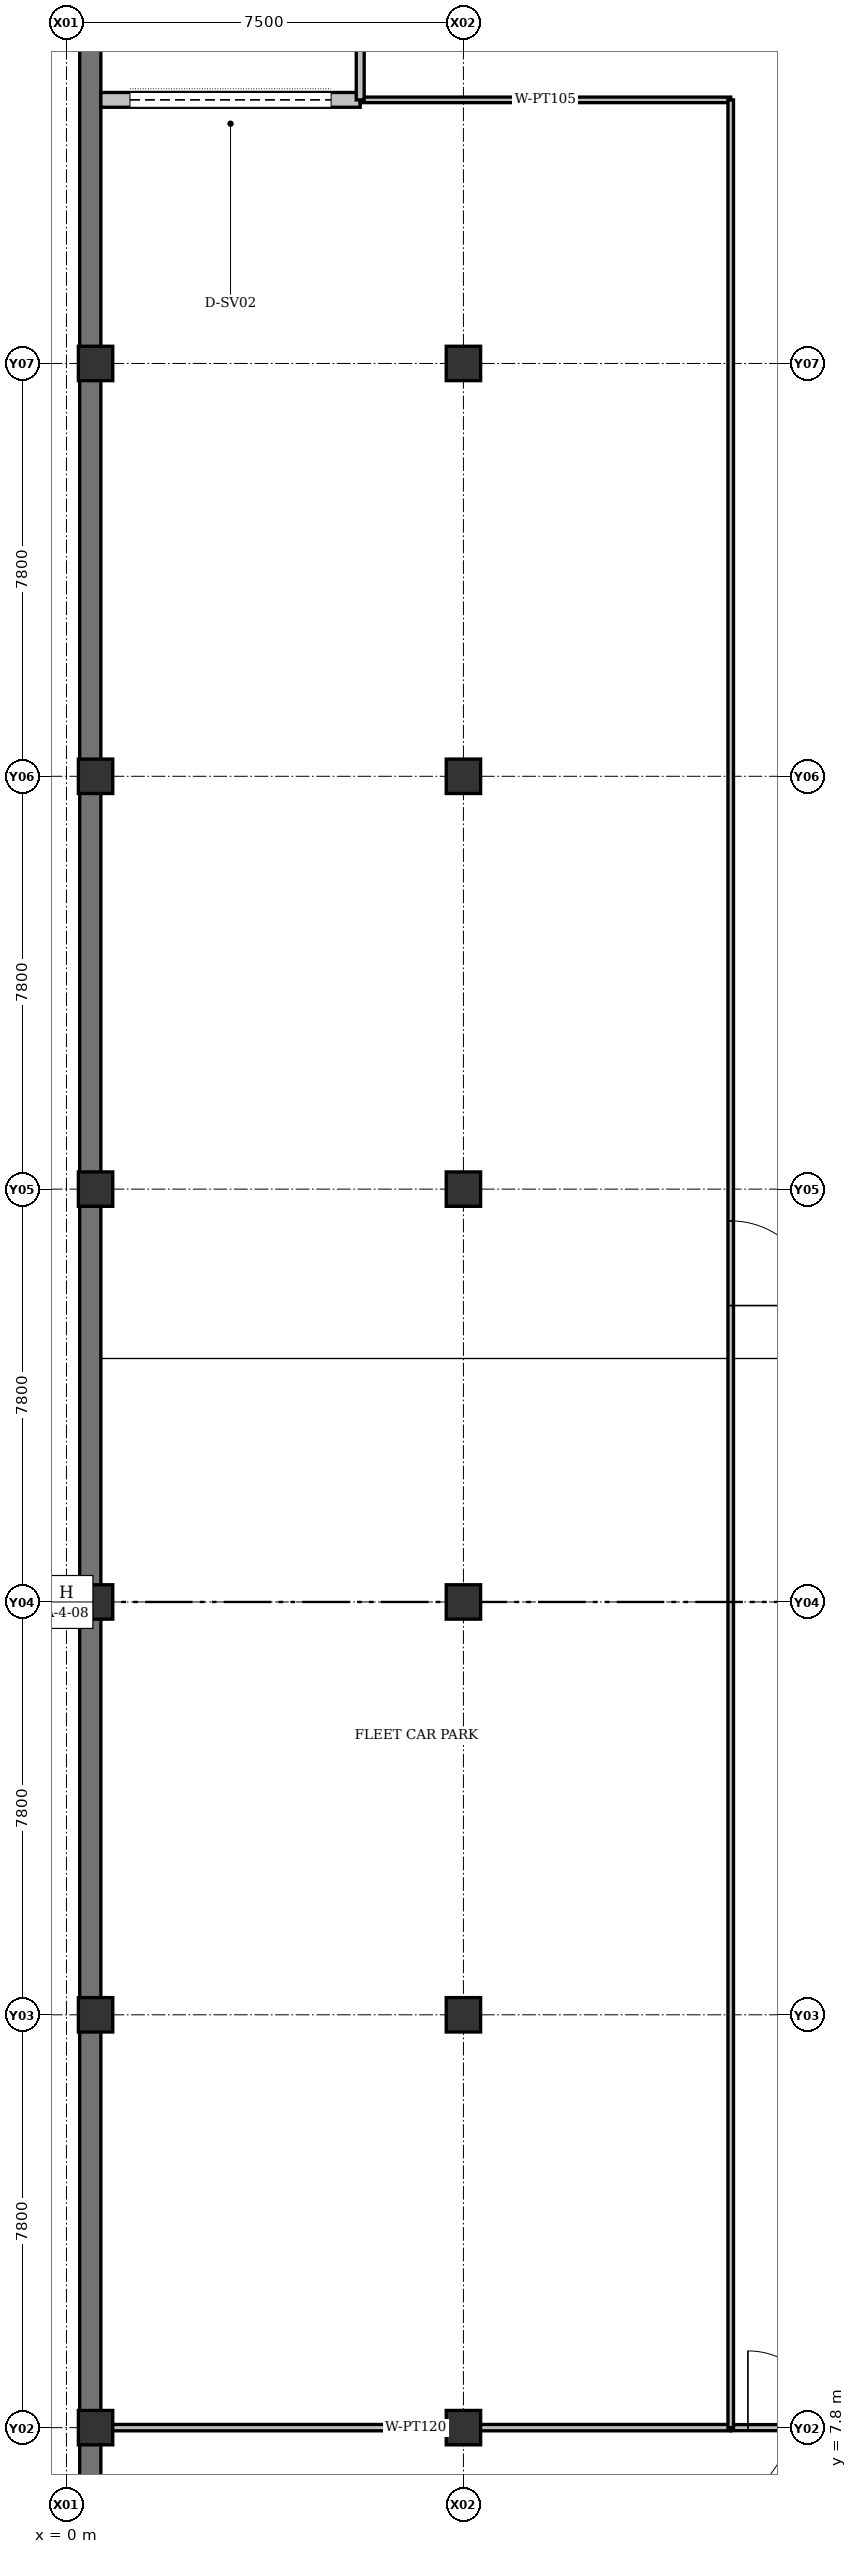
"""IFC4 building model, lengths in metres.
Left out: names, types, materials, properties, quantities, classifications, styles, units other than length and angle.
Written with IfcOpenShell. Run it as: python <this file> out.ifc"""

import sys

from ifc_helpers import new_model, si_unit, direction, frame, frame_2d, origin, origin_2d, place, context, subcontext, project, spatial, rectangle, extrude, element, fill, save


model = new_model("IFC4")
c1 = context("Model", 3, precision=1e-05, world=origin(), true_north=direction((0.0, 1.0)))
c2 = subcontext(c1, "Body", "Model", "MODEL_VIEW")
j1 = project(units=[si_unit("LENGTHUNIT", "METRE"), si_unit("PLANEANGLEUNIT", "RADIAN")], contexts=[c1])
p1 = place(None, origin())
s1 = spatial("IfcSite", under=j1, at=p1, CompositionType="ELEMENT")
p2 = place(p1, origin())
s2 = spatial("IfcBuilding", under=s1, at=p2, CompositionType="ELEMENT")
p3 = place(p2, frame((0.0, 0.0, -8.4)))
s3 = spatial("IfcBuildingStorey", under=s2, at=p3, CompositionType="ELEMENT", Elevation=-8.4)
for number, where, z_axis, x_axis in (
    (1, (0.55, 7.8, -0.3), (0.0, 0.0, 1.0), (1.0, 0.0, 0.0)),
    (2, (0.55, 15.6, -0.3), (0.0, 0.0, 1.0), (1.0, 0.0, 0.0)),
    (3, (0.55, 23.4, -0.3), (0.0, 0.0, 1.0), (1.0, 0.0, 0.0)),
    (4, (0.55, 31.2, -0.3), (0.0, 0.0, 1.0), (1.0, 0.0, 0.0)),
    (5, (0.55, 39.0, -0.3), (0.0, 0.0, 1.0), (1.0, 0.0, 0.0)),
    (6, (0.55, 46.8, -0.3), (0.0, 0.0, 1.0), (1.0, 0.0, 0.0)),
    (7, (7.5, 7.8, -0.3), (0.0, 0.0, 1.0), (1.0, 0.0, 0.0)),
    (8, (7.5, 15.6, -0.3), (0.0, 0.0, 1.0), (1.0, 0.0, 0.0)),
    (9, (7.5, 23.4, -0.3), (0.0, 0.0, 1.0), (1.0, 0.0, 0.0)),
    (10, (7.5, 31.2, -0.3), (0.0, 0.0, 1.0), (1.0, 0.0, 0.0)),
    (11, (7.5, 39.0, -0.3), (0.0, 0.0, 1.0), (1.0, 0.0, 0.0)),
    (12, (7.5, 46.8, -0.3), (0.0, 0.0, 1.0), (1.0, 0.0, 0.0)),
):
    element("IfcColumn", number, at=place(p3, frame(where, z_axis=z_axis, x_axis=x_axis)), inside=s3, PredefinedType="COLUMN", context=c2, shape_type="SweptSolid", body=[
        extrude(rectangle(XDim=0.65, YDim=0.65, at=origin_2d()), origin(), (0.0, 0.0, 1.0), 4.5),
    ])
p4 = place(p3, frame((0.45, 0.2, -0.3), z_axis=(0.0, 0.0, 1.0), x_axis=(0.0, 1.0, 0.0)))
e13 = element("IfcWall", 13, at=p4, inside=s3, PredefinedType="USERDEFINED", context=c2, shape_type="SweptSolid", body=[
    extrude(rectangle(XDim=113.6, YDim=0.4, at=frame_2d((56.8, 0.0))), origin(), (0.0, 0.0, 1.0), 4.26),
])
p5 = place(p3, frame((0.65, 51.78, 0.0), z_axis=(0.0, 0.0, 1.0), x_axis=(1.0, 0.0, 0.0)))
e14 = element("IfcWall", 14, at=p5, inside=s3, PredefinedType="SOLIDWALL", context=c2, shape_type="SweptSolid", body=[
    extrude(rectangle(XDim=4.9, YDim=0.28, at=frame_2d((2.45, 0.0))), origin(), (0.0, 0.0, 1.0), 3.92),
])
p6 = place(p5, frame((0.55, 0.0, 0.0)))
e15 = element("IfcOpeningElement", 15, at=p6, cuts=e14, PredefinedType="OPENING", context=c2, shape_type="SweptSolid", body=[
    extrude(rectangle(XDim=3.8, YDim=3.4, at=frame_2d((1.9, 1.7))), frame((0.0, 0.14, 0.0), z_axis=(0.0, -1.0, 0.0), x_axis=(1.0, 0.0, 0.0)), (0.0, 0.0, 1.0), 0.28),
])
p7 = place(p3, frame((5.55, 51.78, 0.0), z_axis=(0.0, 0.0, 1.0), x_axis=(1.0, 0.0, 0.0)))
e16 = element("IfcWall", 16, at=p7, inside=s3, PredefinedType="PARTITIONING", context=c2, shape_type="SweptSolid", body=[
    extrude(rectangle(XDim=7.0, YDim=0.105, at=frame_2d((3.5, 0.0))), origin(), (0.0, 0.0, 1.0), 3.487),
])
p8 = place(p3, frame((5.55, 63.0, 0.0), z_axis=(0.0, 0.0, 1.0), x_axis=(0.0, -1.0, 0.0)))
e17 = element("IfcWall", 17, at=p8, inside=s3, PredefinedType="PARTITIONING", context=c2, shape_type="SweptSolid", body=[
    extrude(rectangle(XDim=11.22, YDim=0.15, at=frame_2d((5.61, 0.0))), origin(), (0.0, 0.0, 1.0), 3.411),
])
p9 = place(p3, frame((0.65, 7.8, 0.0), z_axis=(0.0, 0.0, 1.0), x_axis=(1.0, 0.0, 0.0)))
e18 = element("IfcWall", 18, at=p9, inside=s3, PredefinedType="PARTITIONING", context=c2, shape_type="SweptSolid", body=[
    extrude(rectangle(XDim=11.9, YDim=0.12, at=frame_2d((5.95, 0.0))), origin(), (0.0, 0.0, 1.0), 3.411),
])
p10 = place(p3, frame((12.55, 7.8, 0.0), z_axis=(0.0, 0.0, 1.0), x_axis=(1.0, 0.0, 0.0)))
e19 = element("IfcWall", 19, at=p10, inside=s3, PredefinedType="PARTITIONING", context=c2, shape_type="SweptSolid", body=[
    extrude(rectangle(XDim=9.28, YDim=0.115, at=frame_2d((4.64, 0.0))), origin(), (0.0, 0.0, 1.0), 3.411),
])
p11 = place(p10, frame((0.325, 0.0, 0.0)))
e20 = element("IfcOpeningElement", 20, at=p11, cuts=e19, PredefinedType="OPENING", context=c2, shape_type="SweptSolid", body=[
    extrude(rectangle(XDim=1.45, YDim=2.2, at=frame_2d((0.725, 1.1))), frame((0.0, 0.058, 0.0), z_axis=(0.0, -1.0, 0.0), x_axis=(1.0, 0.0, 0.0)), (0.0, 0.0, 1.0), 0.115),
])
p12 = place(p3, frame((12.55, 51.78, 0.0), z_axis=(0.0, 0.0, 1.0), x_axis=(0.0, -1.0, 0.0)))
e21 = element("IfcWall", 21, at=p12, inside=s3, PredefinedType="PARTITIONING", context=c2, shape_type="SweptSolid", body=[
    extrude(rectangle(XDim=43.98, YDim=0.105, at=frame_2d((21.99, 0.0))), origin(), (0.0, 0.0, 1.0), 3.411),
])
p13 = place(p12, frame((21.18, 0.0, 0.0)))
e22 = element("IfcOpeningElement", 22, at=p13, cuts=e21, PredefinedType="OPENING", context=c2, shape_type="SweptSolid", body=[
    extrude(rectangle(XDim=1.6, YDim=2.25, at=frame_2d((0.8, 1.125))), frame((0.0, 0.052, 0.0), z_axis=(0.0, -1.0, 0.0), x_axis=(1.0, 0.0, 0.0)), (0.0, 0.0, 1.0), 0.105),
])
p14 = place(p6, origin())
e23 = element("IfcDoor", 23, at=p14, inside=s3, OperationType="ROLLINGUP", PredefinedType="GATE", context=c2, shape_type="SweptSolid", body=[
    extrude(rectangle(XDim=3.8, YDim=3.4, at=frame_2d((1.9, 1.7))), frame((0.0, 0.025, 0.0), z_axis=(0.0, -1.0, 0.0), x_axis=(1.0, 0.0, 0.0)), (0.0, 0.0, 1.0), 0.05),
])
fill(e15, e23)
p15 = place(p11, origin())
e24 = element("IfcDoor", 24, at=p15, inside=s3, OperationType="SINGLE_SWING_LEFT", PredefinedType="DOOR", context=c2, shape_type="SweptSolid", body=[
    extrude(rectangle(XDim=1.45, YDim=2.2, at=frame_2d((0.725, 1.1))), frame((0.0, 0.025, 0.0), z_axis=(0.0, -1.0, 0.0), x_axis=(1.0, 0.0, 0.0)), (0.0, 0.0, 1.0), 0.05),
])
fill(e20, e24)
p16 = place(p13, origin())
e25 = element("IfcDoor", 25, at=p16, inside=s3, OperationType="SINGLE_SWING_RIGHT", PredefinedType="DOOR", context=c2, shape_type="SweptSolid", body=[
    extrude(rectangle(XDim=1.6, YDim=2.25, at=frame_2d((0.8, 1.125))), frame((0.0, 0.025, 0.0), z_axis=(0.0, -1.0, 0.0), x_axis=(1.0, 0.0, 0.0)), (0.0, 0.0, 1.0), 0.05),
])
fill(e22, e25)
save(model, sys.argv[1])
